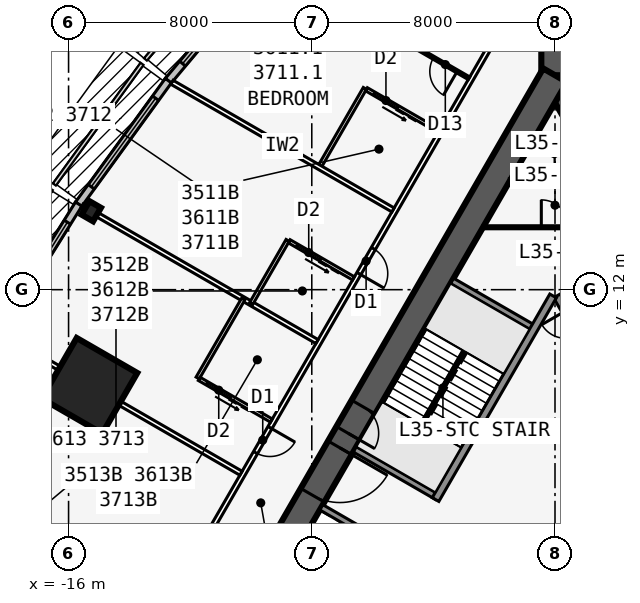
"""IFC4 building model, lengths in metres.
Left out: names, types, materials, properties, quantities, classifications, styles, units other than length and angle.
Written with IfcOpenShell. Run it as: python <this file> out.ifc"""

import sys

from ifc_helpers import new_model, si_unit, direction, frame, frame_2d, origin, origin_2d, place, context, subcontext, project, spatial, rectangle, i_section, extrude, element, fill, save


model = new_model("IFC4")
c1 = context("Model", 3, precision=1e-05, world=origin(), true_north=direction((0.0, 1.0)))
c2 = subcontext(c1, "Body", "Model", "MODEL_VIEW")
j1 = project(units=[si_unit("LENGTHUNIT", "METRE"), si_unit("PLANEANGLEUNIT", "RADIAN")], contexts=[c1])
p1 = place(None, origin())
s1 = spatial("IfcSite", under=j1, at=p1, CompositionType="ELEMENT")
p2 = place(p1, origin())
s2 = spatial("IfcBuilding", under=s1, at=p2, CompositionType="ELEMENT")
p3 = place(p2, frame((0.0, 0.0, 135.1)))
s3 = spatial("IfcBuildingStorey", under=s2, at=p3, CompositionType="ELEMENT", Elevation=135.1)
p4 = place(p3, frame((16.5, -9.526, 0.0), z_axis=(0.0, 0.0, 1.0), x_axis=(-0.499999749417, 0.866025548458, 0.0)))
e1 = element("IfcWall", 1, at=p4, inside=s3, PredefinedType="SHEAR", context=c2, shape_type="SweptSolid", body=[
    extrude(rectangle(XDim=33.0, YDim=0.9, at=frame_2d((16.5, 0.0))), origin(), (0.0, 0.0, 1.0), 3.4),
])
p5 = place(p4, frame((14.15, 0.0, 0.0)))
e2 = element("IfcOpeningElement", 2, at=p5, cuts=e1, PredefinedType="OPENING", context=c2, shape_type="SweptSolid", body=[
    extrude(rectangle(XDim=1.8, YDim=2.13, at=frame_2d((0.9, 1.065))), frame((0.0, 0.46, 0.0), z_axis=(0.0, -1.0, 0.0), x_axis=(1.0, 0.0, 0.0)), (0.0, 0.0, 1.0), 0.92),
])
p6 = place(p4, frame((12.6, 0.0, 0.0)))
e3 = element("IfcOpeningElement", 3, at=p6, cuts=e1, PredefinedType="OPENING", context=c2, shape_type="SweptSolid", body=[
    extrude(rectangle(XDim=1.0, YDim=2.13, at=frame_2d((0.5, 1.065))), frame((0.0, 0.46, 0.0), z_axis=(0.0, -1.0, 0.0), x_axis=(1.0, 0.0, 0.0)), (0.0, 0.0, 1.0), 0.92),
])
p7 = place(p3, frame((5.379, 2.586, 0.0), z_axis=(0.0, 0.0, 1.0), x_axis=(-0.500001375892, 0.866024609411, 0.0)))
e4 = element("IfcWall", 4, at=p7, inside=s3, PredefinedType="SOLIDWALL", context=c2, shape_type="SweptSolid", body=[
    extrude(rectangle(XDim=10.633, YDim=0.25, at=frame_2d((5.316, 0.0))), origin(), (0.0, 0.0, 1.0), 3.235),
])
p8 = place(p7, frame((9.164, 0.0, 0.0)))
e5 = element("IfcOpeningElement", 5, at=p8, cuts=e4, PredefinedType="OPENING", context=c2, shape_type="SweptSolid", body=[
    extrude(rectangle(XDim=0.9, YDim=2.13, at=frame_2d((0.45, 1.065))), frame((0.0, 0.135, 0.0), z_axis=(0.0, -1.0, 0.0), x_axis=(1.0, 0.0, 0.0)), (0.0, 0.0, 1.0), 0.27),
])
p9 = place(p7, frame((1.0, 0.0, 0.0)))
e6 = element("IfcOpeningElement", 6, at=p9, cuts=e4, PredefinedType="OPENING", context=c2, shape_type="SweptSolid", body=[
    extrude(rectangle(XDim=1.1, YDim=2.13, at=frame_2d((0.55, 1.065))), frame((0.0, 0.135, 0.0), z_axis=(0.0, -1.0, 0.0), x_axis=(1.0, 0.0, 0.0)), (0.0, 0.0, 1.0), 0.27),
])
p10 = place(p7, frame((3.9, 0.0, 0.0)))
e7 = element("IfcOpeningElement", 7, at=p10, cuts=e4, PredefinedType="OPENING", context=c2, shape_type="SweptSolid", body=[
    extrude(rectangle(XDim=1.1, YDim=2.13, at=frame_2d((0.55, 1.065))), frame((0.0, 0.135, 0.0), z_axis=(0.0, -1.0, 0.0), x_axis=(1.0, 0.0, 0.0)), (0.0, 0.0, 1.0), 0.27),
])
p11 = place(p7, frame((6.8, 0.0, 0.0)))
e8 = element("IfcOpeningElement", 8, at=p11, cuts=e4, PredefinedType="OPENING", context=c2, shape_type="SweptSolid", body=[
    extrude(rectangle(XDim=1.1, YDim=2.13, at=frame_2d((0.55, 1.065))), frame((0.0, 0.135, 0.0), z_axis=(0.0, -1.0, 0.0), x_axis=(1.0, 0.0, 0.0)), (0.0, 0.0, 1.0), 0.27),
])
p12 = place(p3, frame((0.0, 19.052, 0.0), z_axis=(0.0, 0.0, 1.0), x_axis=(-0.499999749417, -0.866025548458, 0.0)))
e9 = element("IfcWall", 9, at=p12, inside=s3, PredefinedType="SHEAR", context=c2, shape_type="SweptSolid", body=[
    extrude(rectangle(XDim=33.0, YDim=0.9, at=frame_2d((16.5, 0.0))), origin(), (0.0, 0.0, 1.0), 3.4),
])
p13 = place(p12, frame((14.15, 0.0, 0.0)))
e10 = element("IfcOpeningElement", 10, at=p13, cuts=e9, PredefinedType="OPENING", context=c2, shape_type="SweptSolid", body=[
    extrude(rectangle(XDim=1.8, YDim=2.13, at=frame_2d((0.9, 1.065))), frame((0.0, 0.46, 0.0), z_axis=(0.0, -1.0, 0.0), x_axis=(1.0, 0.0, 0.0)), (0.0, 0.0, 1.0), 0.92),
])
p14 = place(p12, frame((12.6, 0.0, 0.0)))
e11 = element("IfcOpeningElement", 11, at=p14, cuts=e9, PredefinedType="OPENING", context=c2, shape_type="SweptSolid", body=[
    extrude(rectangle(XDim=1.0, YDim=2.13, at=frame_2d((0.5, 1.065))), frame((0.0, 0.46, 0.0), z_axis=(0.0, -1.0, 0.0), x_axis=(1.0, 0.0, 0.0)), (0.0, 0.0, 1.0), 0.92),
])
p15 = place(p3, frame((-0.062, 11.794, 0.0), z_axis=(0.0, 0.0, 1.0), x_axis=(-0.500006680225, -0.86602154692, 0.0)))
e12 = element("IfcWall", 12, at=p15, inside=s3, PredefinedType="SOLIDWALL", context=c2, shape_type="SweptSolid", body=[
    extrude(rectangle(XDim=7.733, YDim=0.25, at=frame_2d((3.866, 0.0))), origin(), (0.0, 0.0, 1.0), 3.235),
])
for number, where, z_axis, x_axis in (
    (13, (-0.679, 10.727, 0.0), (0.0, 0.0, 1.0), (-0.866, 0.5, 0.0)),
    (14, (-3.879, 5.184, 0.0), (0.0, 0.0, 1.0), (-0.866, 0.5, 0.0)),
    (15, (-4.979, 3.279, 0.0), (0.0, 0.0, 1.0), (-0.866, 0.5, 0.0)),
):
    element("IfcWall", number, at=place(p3, frame(where, z_axis=z_axis, x_axis=x_axis)), inside=s3, PredefinedType="SOLIDWALL", context=c2, shape_type="SweptSolid", body=[
        extrude(rectangle(XDim=3.125, YDim=0.2, at=frame_2d((1.562, 0.0))), origin(), (0.0, 0.0, 1.0), 3.235),
    ])
p16 = place(p3, frame((0.0, 19.052, 0.0), z_axis=(0.0, 0.0, 1.0), x_axis=(0.0, 1.0, 0.0)))
e16 = element("IfcWall", 16, at=p16, inside=s3, PredefinedType="SHEAR", context=c2, shape_type="SweptSolid", body=[
    extrude(rectangle(XDim=4.746, YDim=0.9, at=frame_2d((2.373, 0.0))), origin(), (0.0, 0.0, 1.0), 3.4),
])
p17 = place(p16, frame((1.8, 0.0, 0.0)))
e17 = element("IfcOpeningElement", 17, at=p17, cuts=e16, PredefinedType="OPENING", context=c2, shape_type="SweptSolid", body=[
    extrude(rectangle(XDim=1.8, YDim=2.13, at=frame_2d((0.9, 1.065))), frame((0.0, 0.46, 0.0), z_axis=(0.0, -1.0, 0.0), x_axis=(1.0, 0.0, 0.0)), (0.0, 0.0, 1.0), 0.92),
])
p18 = place(p3, frame((-15.254, 14.58, 0.0), z_axis=(0.0, 0.0, 1.0), x_axis=(-0.866025403784, 0.5, 0.0)))
e18 = element("IfcColumn", 18, at=p18, inside=s3, PredefinedType="COLUMN", context=c2, shape_type="SweptSolid", body=[
    extrude(i_section(OverallWidth=0.437, OverallDepth=0.513, WebThickness=0.061, FlangeThickness=0.097, at=origin_2d()), origin(), (0.0, 0.0, 1.0), 3.4),
])
p19 = place(p3, frame((-15.312, 8.84, 0.0), z_axis=(0.0, 0.0, 1.0), x_axis=(-0.866025403784, 0.5, 0.0)))
e19 = element("IfcColumn", 19, at=p19, inside=s3, PredefinedType="COLUMN", context=c2, shape_type="SweptSolid", body=[
    extrude(rectangle(XDim=2.3, YDim=2.3, at=origin_2d()), origin(), (0.0, 0.0, 1.0), 3.4),
])
p20 = place(p3, frame((-9.465, 22.76, 0.0), z_axis=(0.0, 0.0, 1.0), x_axis=(-0.641810386606, -0.766863369607, 0.0)))
e20 = element("IfcWall", 20, at=p20, inside=s3, PredefinedType="STANDARD", context=c2, shape_type="SweptSolid", body=[
    extrude(rectangle(XDim=5.076, YDim=0.25, at=frame_2d((2.538, 0.0))), origin(), (0.0, 0.0, 1.0), 3.235),
])
p21 = place(p20, frame((0.738, 0.0, 0.45)))
e21 = element("IfcOpeningElement", 21, at=p21, cuts=e20, PredefinedType="OPENING", context=c2, shape_type="SweptSolid", body=[
    extrude(rectangle(XDim=3.6, YDim=2.4, at=frame_2d((1.8, 1.2))), frame((0.0, 0.135, 0.0), z_axis=(0.0, -1.0, 0.0), x_axis=(1.0, 0.0, 0.0)), (0.0, 0.0, 1.0), 0.27),
])
p22 = place(p3, frame((-12.718, 18.875, 0.0), z_axis=(0.0, 0.0, 1.0), x_axis=(-0.587669188412, -0.809101307001, 0.0)))
e22 = element("IfcWall", 22, at=p22, inside=s3, PredefinedType="STANDARD", context=c2, shape_type="SweptSolid", body=[
    extrude(rectangle(XDim=5.028, YDim=0.25, at=frame_2d((2.514, 0.0))), origin(), (0.0, 0.0, 1.0), 3.235),
])
p23 = place(p22, frame((0.714, 0.0, 0.45)))
e23 = element("IfcOpeningElement", 23, at=p23, cuts=e22, PredefinedType="OPENING", context=c2, shape_type="SweptSolid", body=[
    extrude(rectangle(XDim=3.6, YDim=2.4, at=frame_2d((1.8, 1.2))), frame((0.0, 0.135, 0.0), z_axis=(0.0, -1.0, 0.0), x_axis=(1.0, 0.0, 0.0)), (0.0, 0.0, 1.0), 0.27),
])
p24 = place(p3, frame((-15.667, 14.814, 0.0), z_axis=(0.0, 0.0, 1.0), x_axis=(-0.529990167382, -0.84800378683, 0.0)))
e24 = element("IfcWall", 24, at=p24, inside=s3, PredefinedType="STANDARD", context=c2, shape_type="SweptSolid", body=[
    extrude(rectangle(XDim=5.003, YDim=0.25, at=frame_2d((2.501, 0.0))), origin(), (0.0, 0.0, 1.0), 3.235),
])
p25 = place(p24, frame((0.701, 0.0, 0.45)))
e25 = element("IfcOpeningElement", 25, at=p25, cuts=e24, PredefinedType="OPENING", context=c2, shape_type="SweptSolid", body=[
    extrude(rectangle(XDim=3.6, YDim=2.4, at=frame_2d((1.8, 1.2))), frame((0.0, 0.135, 0.0), z_axis=(0.0, -1.0, 0.0), x_axis=(1.0, 0.0, 0.0)), (0.0, 0.0, 1.0), 0.27),
])
p26 = place(p3, frame((-0.5, 22.836, 0.0), z_axis=(0.0, 0.0, 1.0), x_axis=(-0.500001677587, -0.866024435227, 0.0)))
e26 = element("IfcWall", 26, at=p26, inside=s3, PredefinedType="PARTITIONING", context=c2, shape_type="SweptSolid", body=[
    extrude(rectangle(XDim=39.054, YDim=0.15, at=frame_2d((19.527, 0.0))), origin(), (0.0, 0.0, 1.0), 3.235),
])
p27 = place(p26, frame((1.558, 0.0, 0.0)))
e27 = element("IfcOpeningElement", 27, at=p27, cuts=e26, PredefinedType="OPENING", context=c2, shape_type="SweptSolid", body=[
    extrude(rectangle(XDim=0.95, YDim=2.13, at=frame_2d((0.475, 1.065))), frame((0.0, 0.085, 0.0), z_axis=(0.0, -1.0, 0.0), x_axis=(1.0, 0.0, 0.0)), (0.0, 0.0, 1.0), 0.17),
])
p28 = place(p26, frame((10.952, 0.0, 0.0)))
e28 = element("IfcOpeningElement", 28, at=p28, cuts=e26, PredefinedType="OPENING", context=c2, shape_type="SweptSolid", body=[
    extrude(rectangle(XDim=0.95, YDim=2.13, at=frame_2d((0.475, 1.065))), frame((0.0, 0.085, 0.0), z_axis=(0.0, -1.0, 0.0), x_axis=(1.0, 0.0, 0.0)), (0.0, 0.0, 1.0), 0.17),
])
p29 = place(p26, frame((17.752, 0.0, 0.0)))
e29 = element("IfcOpeningElement", 29, at=p29, cuts=e26, PredefinedType="OPENING", context=c2, shape_type="SweptSolid", body=[
    extrude(rectangle(XDim=0.95, YDim=2.13, at=frame_2d((0.475, 1.065))), frame((0.0, 0.085, 0.0), z_axis=(0.0, -1.0, 0.0), x_axis=(1.0, 0.0, 0.0)), (0.0, 0.0, 1.0), 0.17),
])
p30 = place(p26, frame((21.552, 0.0, 0.0)))
e30 = element("IfcOpeningElement", 30, at=p30, cuts=e26, PredefinedType="OPENING", context=c2, shape_type="SweptSolid", body=[
    extrude(rectangle(XDim=0.95, YDim=2.13, at=frame_2d((0.475, 1.065))), frame((0.0, 0.085, 0.0), z_axis=(0.0, -1.0, 0.0), x_axis=(1.0, 0.0, 0.0)), (0.0, 0.0, 1.0), 0.17),
])
p31 = place(p26, frame((30.952, 0.0, 0.0)))
e31 = element("IfcOpeningElement", 31, at=p31, cuts=e26, PredefinedType="OPENING", context=c2, shape_type="SweptSolid", body=[
    extrude(rectangle(XDim=0.95, YDim=2.13, at=frame_2d((0.475, 1.065))), frame((0.0, 0.085, 0.0), z_axis=(0.0, -1.0, 0.0), x_axis=(1.0, 0.0, 0.0)), (0.0, 0.0, 1.0), 0.17),
])
p32 = place(p26, frame((37.752, 0.0, 0.0)))
e32 = element("IfcOpeningElement", 32, at=p32, cuts=e26, PredefinedType="OPENING", context=c2, shape_type="SweptSolid", body=[
    extrude(rectangle(XDim=0.95, YDim=2.13, at=frame_2d((0.475, 1.065))), frame((0.0, 0.085, 0.0), z_axis=(0.0, -1.0, 0.0), x_axis=(1.0, 0.0, 0.0)), (0.0, 0.0, 1.0), 0.17),
])
p33 = place(p3, frame((-2.829, 18.954, 0.0), z_axis=(0.0, 0.0, 1.0), x_axis=(-0.866015739374, 0.500016738876, 0.0)))
e33 = element("IfcWall", 33, at=p33, inside=s3, PredefinedType="PARTITIONING", context=c2, shape_type="SweptSolid", body=[
    extrude(rectangle(XDim=7.516, YDim=0.1, at=frame_2d((3.758, 0.0))), origin(), (0.0, 0.0, 1.0), 2.389),
])
p34 = place(p33, frame((0.45, 0.0, 0.0)))
e34 = element("IfcOpeningElement", 34, at=p34, cuts=e33, PredefinedType="OPENING", context=c2, shape_type="SweptSolid", body=[
    extrude(rectangle(XDim=0.9, YDim=2.13, at=frame_2d((0.45, 1.065))), frame((0.0, 0.06, 0.0), z_axis=(0.0, -1.0, 0.0), x_axis=(1.0, 0.0, 0.0)), (0.0, 0.0, 1.0), 0.12),
])
p35 = place(p3, frame((-5.329, 14.623, 0.0), z_axis=(0.0, 0.0, 1.0), x_axis=(-0.866011723728, 0.500023693804, 0.0)))
e35 = element("IfcWall", 35, at=p35, inside=s3, PredefinedType="PARTITIONING", context=c2, shape_type="SweptSolid", body=[
    extrude(rectangle(XDim=8.395, YDim=0.15, at=frame_2d((4.198, 0.0))), origin(), (0.0, 0.0, 1.0), 2.389),
])
p36 = place(p3, frame((-7.829, 10.293, 0.0), z_axis=(0.0, 0.0, 1.0), x_axis=(-0.866027015393, 0.499997208602, 0.0)))
e36 = element("IfcWall", 36, at=p36, inside=s3, PredefinedType="PARTITIONING", context=c2, shape_type="SweptSolid", body=[
    extrude(rectangle(XDim=8.922, YDim=0.15, at=frame_2d((4.461, 0.0))), origin(), (0.0, 0.0, 1.0), 2.389),
])
p37 = place(p3, frame((-10.329, 5.963, 0.0), z_axis=(0.0, 0.0, 1.0), x_axis=(-0.866025170687, 0.500000403736, 0.0)))
e37 = element("IfcWall", 37, at=p37, inside=s3, PredefinedType="PARTITIONING", context=c2, shape_type="SweptSolid", body=[
    extrude(rectangle(XDim=9.099, YDim=0.15, at=frame_2d((4.549, 0.0))), origin(), (0.0, 0.0, 1.0), 2.389),
])
p38 = place(p3, frame((-12.829, 1.633, 0.0), z_axis=(0.0, 0.0, 1.0), x_axis=(-0.866027015393, 0.499997208602, 0.0)))
e38 = element("IfcWall", 38, at=p38, inside=s3, PredefinedType="PARTITIONING", context=c2, shape_type="SweptSolid", body=[
    extrude(rectangle(XDim=8.922, YDim=0.1, at=frame_2d((4.461, 0.0))), origin(), (0.0, 0.0, 1.0), 2.389),
])
p39 = place(p38, frame((0.45, 0.0, 0.0)))
e39 = element("IfcOpeningElement", 39, at=p39, cuts=e38, PredefinedType="OPENING", context=c2, shape_type="SweptSolid", body=[
    extrude(rectangle(XDim=0.9, YDim=2.13, at=frame_2d((0.45, 1.065))), frame((0.0, 0.06, 0.0), z_axis=(0.0, -1.0, 0.0), x_axis=(1.0, 0.0, 0.0)), (0.0, 0.0, 1.0), 0.12),
])
p40 = place(p3, frame((-6.253, 18.622, 0.0), z_axis=(0.0, 0.0, 1.0), x_axis=(-0.499990139034, -0.866031096941, 0.0)))
e40 = element("IfcWall", 40, at=p40, inside=s3, PredefinedType="PLUMBINGWALL", context=c2, shape_type="SweptSolid", body=[
    extrude(rectangle(XDim=3.0, YDim=0.12, at=frame_2d((1.5, 0.0))), origin(), (0.0, 0.0, 1.0), 3.235),
])
p41 = place(p3, frame((-3.829, 17.221, 0.0), z_axis=(0.0, 0.0, 1.0), x_axis=(-0.865997131366, 0.500048966069, 0.0)))
e41 = element("IfcWall", 41, at=p41, inside=s3, PredefinedType="PLUMBINGWALL", context=c2, shape_type="SweptSolid", body=[
    extrude(rectangle(XDim=2.74, YDim=0.12, at=frame_2d((1.37, 0.0))), origin(), (0.0, 0.0, 1.0), 3.235),
])
p42 = place(p41, frame((1.55, 0.0, 0.0)))
e42 = element("IfcOpeningElement", 42, at=p42, cuts=e41, PredefinedType="OPENING", context=c2, shape_type="SweptSolid", body=[
    extrude(rectangle(XDim=0.9, YDim=2.13, at=frame_2d((0.45, 1.065))), frame((0.0, 0.07, 0.0), z_axis=(0.0, -1.0, 0.0), x_axis=(1.0, 0.0, 0.0)), (0.0, 0.0, 1.0), 0.14),
])
p43 = place(p3, frame((-8.793, 13.622, 0.0), z_axis=(0.0, 0.0, 1.0), x_axis=(-0.500001309137, -0.866024647952, 0.0)))
e43 = element("IfcWall", 43, at=p43, inside=s3, PredefinedType="PLUMBINGWALL", context=c2, shape_type="SweptSolid", body=[
    extrude(rectangle(XDim=2.4, YDim=0.12, at=frame_2d((1.2, 0.0))), origin(), (0.0, 0.0, 1.0), 3.235),
])
p44 = place(p3, frame((-6.628, 12.372, 0.0), z_axis=(0.0, 0.0, 1.0), x_axis=(-0.866005645448, 0.500034220881, 0.0)))
e44 = element("IfcWall", 44, at=p44, inside=s3, PredefinedType="PLUMBINGWALL", context=c2, shape_type="SweptSolid", body=[
    extrude(rectangle(XDim=2.44, YDim=0.12, at=frame_2d((1.22, 0.0))), origin(), (0.0, 0.0, 1.0), 3.235),
])
p45 = place(p44, frame((1.25, 0.0, 0.0)))
e45 = element("IfcOpeningElement", 45, at=p45, cuts=e44, PredefinedType="OPENING", context=c2, shape_type="SweptSolid", body=[
    extrude(rectangle(XDim=0.9, YDim=2.13, at=frame_2d((0.45, 1.065))), frame((0.0, 0.07, 0.0), z_axis=(0.0, -1.0, 0.0), x_axis=(1.0, 0.0, 0.0)), (0.0, 0.0, 1.0), 0.14),
])
p46 = place(p3, frame((-10.253, 11.693, 0.0), z_axis=(0.0, 0.0, 1.0), x_axis=(-0.499990139034, -0.866031096941, 0.0)))
e46 = element("IfcWall", 46, at=p46, inside=s3, PredefinedType="PLUMBINGWALL", context=c2, shape_type="SweptSolid", body=[
    extrude(rectangle(XDim=3.0, YDim=0.12, at=frame_2d((1.5, 0.0))), origin(), (0.0, 0.0, 1.0), 3.235),
])
p47 = place(p3, frame((-9.329, 7.695, 0.0), z_axis=(0.0, 0.0, 1.0), x_axis=(-0.866035715982, 0.499982138324, 0.0)))
e47 = element("IfcWall", 47, at=p47, inside=s3, PredefinedType="PLUMBINGWALL", context=c2, shape_type="SweptSolid", body=[
    extrude(rectangle(XDim=2.74, YDim=0.12, at=frame_2d((1.37, 0.0))), origin(), (0.0, 0.0, 1.0), 3.235),
])
p48 = place(p47, frame((1.55, 0.0, 0.0)))
e48 = element("IfcOpeningElement", 48, at=p48, cuts=e47, PredefinedType="OPENING", context=c2, shape_type="SweptSolid", body=[
    extrude(rectangle(XDim=0.9, YDim=2.13, at=frame_2d((0.45, 1.065))), frame((0.0, 0.07, 0.0), z_axis=(0.0, -1.0, 0.0), x_axis=(1.0, 0.0, 0.0)), (0.0, 0.0, 1.0), 0.14),
])
p49 = place(p3, frame((-1.501, 15.552, 0.0), z_axis=(0.0, 0.0, 1.0), x_axis=(1.0, 0.0, 0.0)))
e49 = element("IfcWall", 49, at=p49, inside=s3, PredefinedType="SOLIDWALL", context=c2, shape_type="SweptSolid", body=[
    extrude(rectangle(XDim=3.002, YDim=0.2, at=frame_2d((1.501, 0.0))), origin(), (0.0, 0.0, 1.0), 3.235),
])
p50 = place(p3, frame((-2.367, 14.052, 0.0), z_axis=(0.0, 0.0, 1.0), x_axis=(1.0, 0.0, 0.0)))
e50 = element("IfcWall", 50, at=p50, inside=s3, PredefinedType="PARTITIONING", context=c2, shape_type="SweptSolid", body=[
    extrude(rectangle(XDim=4.734, YDim=0.1, at=frame_2d((2.367, 0.0))), origin(), (0.0, 0.0, 1.0), 3.235),
])
p51 = place(p50, frame((1.917, 0.0, 0.0)))
e51 = element("IfcOpeningElement", 51, at=p51, cuts=e50, PredefinedType="OPENING", context=c2, shape_type="SweptSolid", body=[
    extrude(rectangle(XDim=0.9, YDim=2.13, at=frame_2d((0.45, 1.065))), frame((0.0, 0.06, 0.0), z_axis=(0.0, -1.0, 0.0), x_axis=(1.0, 0.0, 0.0)), (0.0, 0.0, 1.0), 0.12),
])
p52 = place(p3, frame((-2.988, 9.978, 0.0), z_axis=(0.0, 0.0, 1.0), x_axis=(-0.499992232847, -0.866029888106, 0.0)))
e52 = element("IfcWall", 52, at=p52, inside=s3, PredefinedType="SOLIDWALL", context=c2, shape_type="SweptSolid", body=[
    extrude(rectangle(XDim=2.794, YDim=0.1, at=frame_2d((1.397, 0.0))), origin(), (0.0, 0.0, 1.0), 3.4),
])
p53 = place(p21, origin())
e53 = element("IfcWindow", 53, at=p53, inside=s3, PartitioningType="SINGLE_PANEL", PredefinedType="WINDOW", context=c2, shape_type="SweptSolid", body=[
    extrude(rectangle(XDim=3.6, YDim=2.4, at=frame_2d((1.8, 1.2))), frame((0.0, 0.03, 0.0), z_axis=(0.0, -1.0, 0.0), x_axis=(1.0, 0.0, 0.0)), (0.0, 0.0, 1.0), 0.06),
])
fill(e21, e53)
p54 = place(p23, origin())
e54 = element("IfcWindow", 54, at=p54, inside=s3, PartitioningType="SINGLE_PANEL", PredefinedType="WINDOW", context=c2, shape_type="SweptSolid", body=[
    extrude(rectangle(XDim=3.6, YDim=2.4, at=frame_2d((1.8, 1.2))), frame((0.0, 0.03, 0.0), z_axis=(0.0, -1.0, 0.0), x_axis=(1.0, 0.0, 0.0)), (0.0, 0.0, 1.0), 0.06),
])
fill(e23, e54)
p55 = place(p25, origin())
e55 = element("IfcWindow", 55, at=p55, inside=s3, PartitioningType="SINGLE_PANEL", PredefinedType="WINDOW", context=c2, shape_type="SweptSolid", body=[
    extrude(rectangle(XDim=3.6, YDim=2.4, at=frame_2d((1.8, 1.2))), frame((0.0, 0.03, 0.0), z_axis=(0.0, -1.0, 0.0), x_axis=(1.0, 0.0, 0.0)), (0.0, 0.0, 1.0), 0.06),
])
fill(e25, e55)
p56 = place(p34, origin())
e56 = element("IfcDoor", 56, at=p56, inside=s3, OperationType="SINGLE_SWING_LEFT", PredefinedType="DOOR", context=c2, shape_type="SweptSolid", body=[
    extrude(rectangle(XDim=0.9, YDim=2.13, at=frame_2d((0.45, 1.065))), frame((0.0, 0.025, 0.0), z_axis=(0.0, -1.0, 0.0), x_axis=(1.0, 0.0, 0.0)), (0.0, 0.0, 1.0), 0.05),
])
fill(e34, e56)
p57 = place(p42, origin())
e57 = element("IfcDoor", 57, at=p57, inside=s3, OperationType="SLIDING_TO_LEFT", PredefinedType="DOOR", context=c2, shape_type="SweptSolid", body=[
    extrude(rectangle(XDim=0.9, YDim=2.13, at=frame_2d((0.45, 1.065))), frame((0.0, 0.025, 0.0), z_axis=(0.0, -1.0, 0.0), x_axis=(1.0, 0.0, 0.0)), (0.0, 0.0, 1.0), 0.05),
])
fill(e42, e57)
p58 = place(p45, origin())
e58 = element("IfcDoor", 58, at=p58, inside=s3, OperationType="SLIDING_TO_LEFT", PredefinedType="DOOR", context=c2, shape_type="SweptSolid", body=[
    extrude(rectangle(XDim=0.9, YDim=2.13, at=frame_2d((0.45, 1.065))), frame((0.0, 0.025, 0.0), z_axis=(0.0, -1.0, 0.0), x_axis=(1.0, 0.0, 0.0)), (0.0, 0.0, 1.0), 0.05),
])
fill(e45, e58)
p59 = place(p28, origin())
e59 = element("IfcDoor", 59, at=p59, inside=s3, OperationType="SINGLE_SWING_RIGHT", PredefinedType="DOOR", context=c2, shape_type="SweptSolid", body=[
    extrude(rectangle(XDim=0.95, YDim=2.13, at=frame_2d((0.475, 1.065))), frame((0.0, 0.025, 0.0), z_axis=(0.0, -1.0, 0.0), x_axis=(1.0, 0.0, 0.0)), (0.0, 0.0, 1.0), 0.05),
])
fill(e28, e59)
p60 = place(p48, origin())
e60 = element("IfcDoor", 60, at=p60, inside=s3, OperationType="SLIDING_TO_LEFT", PredefinedType="DOOR", context=c2, shape_type="SweptSolid", body=[
    extrude(rectangle(XDim=0.9, YDim=2.13, at=frame_2d((0.45, 1.065))), frame((0.0, 0.025, 0.0), z_axis=(0.0, -1.0, 0.0), x_axis=(1.0, 0.0, 0.0)), (0.0, 0.0, 1.0), 0.05),
])
fill(e48, e60)
p61 = place(p29, origin())
e61 = element("IfcDoor", 61, at=p61, inside=s3, OperationType="SINGLE_SWING_LEFT", PredefinedType="DOOR", context=c2, shape_type="SweptSolid", body=[
    extrude(rectangle(XDim=0.95, YDim=2.13, at=frame_2d((0.475, 1.065))), frame((0.0, 0.025, 0.0), z_axis=(0.0, -1.0, 0.0), x_axis=(1.0, 0.0, 0.0)), (0.0, 0.0, 1.0), 0.05),
])
fill(e29, e61)
p62 = place(p13, origin())
e62 = element("IfcDoor", 62, at=p62, inside=s3, OperationType="DOUBLE_DOOR_SINGLE_SWING", PredefinedType="DOOR", context=c2, shape_type="SweptSolid", body=[
    extrude(rectangle(XDim=1.8, YDim=2.13, at=frame_2d((0.9, 1.065))), frame((0.0, 0.025, 0.0), z_axis=(0.0, -1.0, 0.0), x_axis=(1.0, 0.0, 0.0)), (0.0, 0.0, 1.0), 0.05),
])
fill(e10, e62)
p63 = place(p14, origin())
e63 = element("IfcDoor", 63, at=p63, inside=s3, OperationType="SINGLE_SWING_RIGHT", PredefinedType="DOOR", context=c2, shape_type="SweptSolid", body=[
    extrude(rectangle(XDim=1.0, YDim=2.13, at=frame_2d((0.5, 1.065))), frame((0.0, 0.025, 0.0), z_axis=(0.0, -1.0, 0.0), x_axis=(1.0, 0.0, 0.0)), (0.0, 0.0, 1.0), 0.05),
])
fill(e11, e63)
p64 = place(p51, origin())
e64 = element("IfcDoor", 64, at=p64, inside=s3, OperationType="SINGLE_SWING_LEFT", PredefinedType="DOOR", context=c2, shape_type="SweptSolid", body=[
    extrude(rectangle(XDim=0.9, YDim=2.13, at=frame_2d((0.45, 1.065))), frame((0.0, 0.025, 0.0), z_axis=(0.0, -1.0, 0.0), x_axis=(1.0, 0.0, 0.0)), (0.0, 0.0, 1.0), 0.05),
])
fill(e51, e64)
save(model, sys.argv[1])
